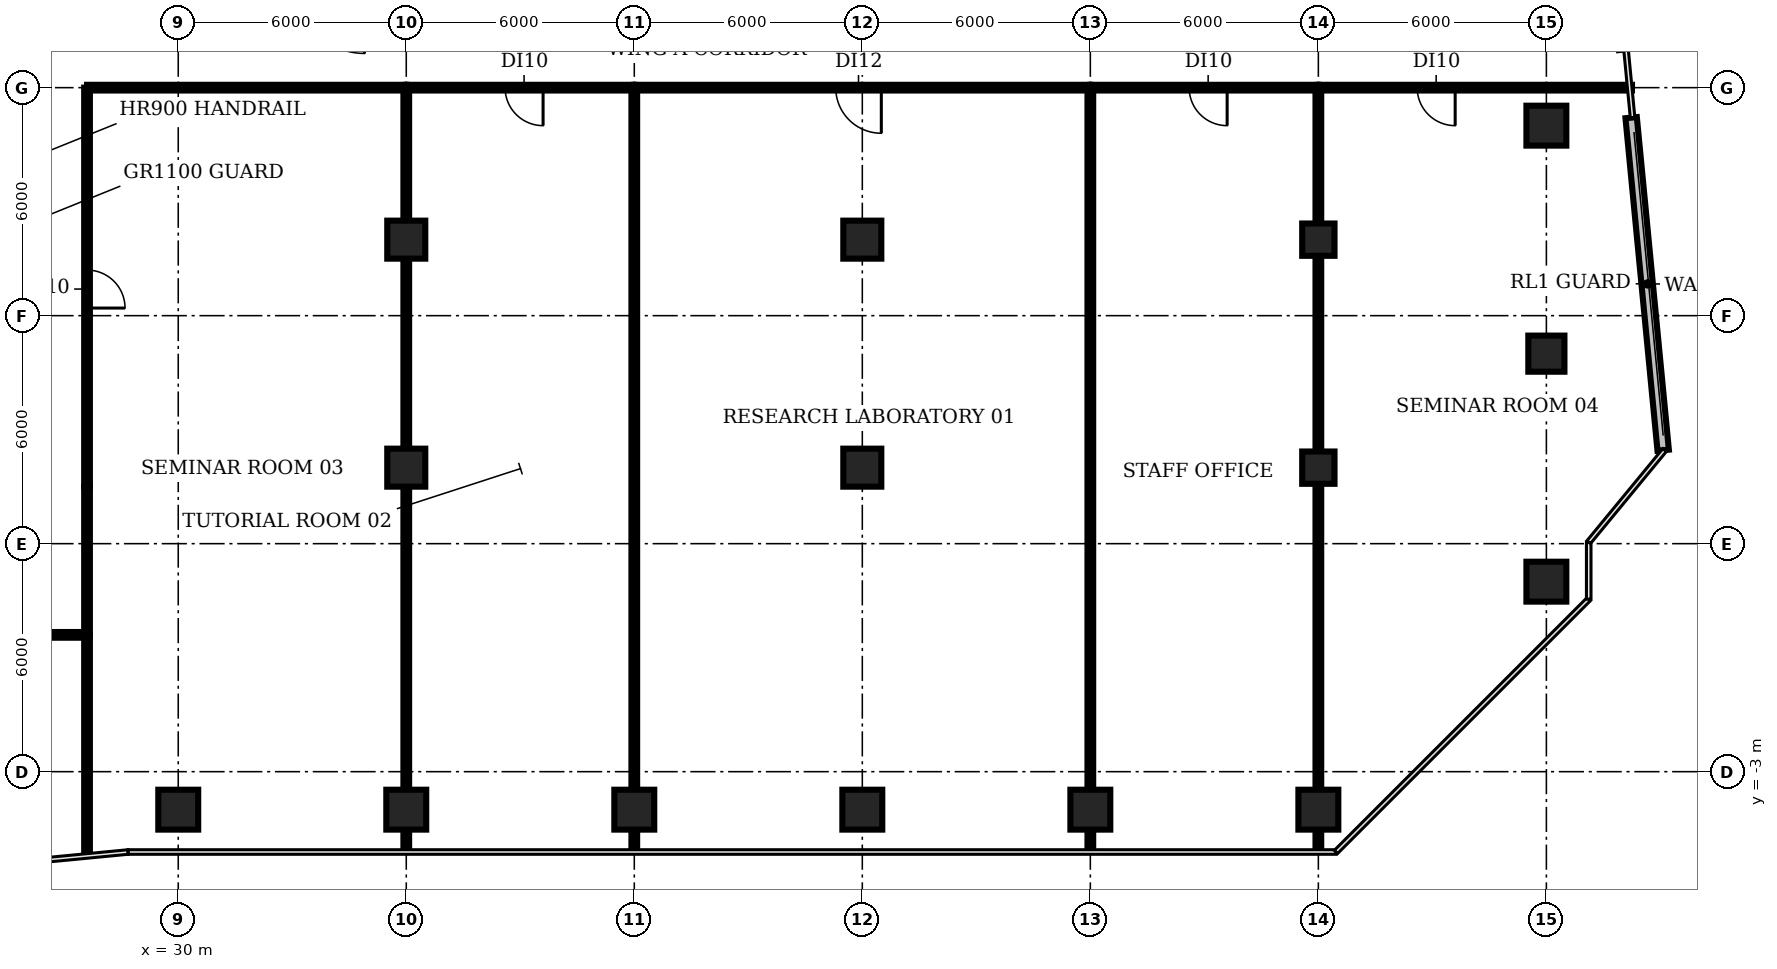
"""IFC4 building model, lengths in metres.
Left out: names, types, materials, properties, quantities, classifications, styles, units other than length and angle.
Written with IfcOpenShell. Run it as: python <this file> out.ifc"""

import sys

from ifc_helpers import new_model, si_unit, direction, frame, frame_2d, origin, origin_2d, place, context, subcontext, project, spatial, rectangle, circle, extrude, element, fill, save


model = new_model("IFC4")
c1 = context("Model", 3, precision=1e-05, world=origin(), true_north=direction((0.0, 1.0)))
c2 = subcontext(c1, "Body", "Model", "MODEL_VIEW")
j1 = project(units=[si_unit("LENGTHUNIT", "METRE"), si_unit("PLANEANGLEUNIT", "RADIAN")], contexts=[c1])
p1 = place(None, origin())
s1 = spatial("IfcSite", under=j1, at=p1, CompositionType="ELEMENT")
p2 = place(p1, origin())
s2 = spatial("IfcBuilding", under=s1, at=p2, CompositionType="ELEMENT")
p3 = place(p2, frame((0.0, 0.0, 75.2)))
s3 = spatial("IfcBuildingStorey", under=s2, at=p3, CompositionType="ELEMENT", Elevation=75.2)
for number, where, z_axis, x_axis in (
    (1, (30.0, -4.0, 0.0), (0.0, 0.0, 1.0), (1.0, 0.0, 0.0)),
    (2, (36.0, -4.0, 0.0), (0.0, 0.0, 1.0), (1.0, 0.0, 0.0)),
):
    element("IfcColumn", number, at=place(p3, frame(where, z_axis=z_axis, x_axis=x_axis)), inside=s3, PredefinedType="COLUMN", context=c2, shape_type="SweptSolid", body=[
        extrude(rectangle(XDim=1.05, YDim=1.05, at=origin_2d()), origin(), (0.0, 0.0, 1.0), 3.2),
    ])
for number, where, z_axis, x_axis in (
    (3, (36.0, 5.0, 0.0), (0.0, 0.0, 1.0), (1.0, 0.0, 0.0)),
    (4, (36.0, 11.0, 0.0), (0.0, 0.0, 1.0), (1.0, 0.0, 0.0)),
):
    element("IfcColumn", number, at=place(p3, frame(where, z_axis=z_axis, x_axis=x_axis)), inside=s3, PredefinedType="COLUMN", context=c2, shape_type="SweptSolid", body=[
        extrude(rectangle(XDim=1.0, YDim=1.0, at=origin_2d()), origin(), (0.0, 0.0, 1.0), 3.2),
    ])
for number, where, z_axis, x_axis in (
    (5, (42.0, -4.0, 0.0), (0.0, 0.0, 1.0), (1.0, 0.0, 0.0)),
    (6, (48.0, -4.0, 0.0), (0.0, 0.0, 1.0), (1.0, 0.0, 0.0)),
):
    element("IfcColumn", number, at=place(p3, frame(where, z_axis=z_axis, x_axis=x_axis)), inside=s3, PredefinedType="COLUMN", context=c2, shape_type="SweptSolid", body=[
        extrude(rectangle(XDim=1.05, YDim=1.05, at=origin_2d()), origin(), (0.0, 0.0, 1.0), 3.2),
    ])
for number, where, z_axis, x_axis in (
    (7, (48.0, 5.0, 0.0), (0.0, 0.0, 1.0), (1.0, 0.0, 0.0)),
    (8, (48.0, 11.0, 0.0), (0.0, 0.0, 1.0), (1.0, 0.0, 0.0)),
):
    element("IfcColumn", number, at=place(p3, frame(where, z_axis=z_axis, x_axis=x_axis)), inside=s3, PredefinedType="COLUMN", context=c2, shape_type="SweptSolid", body=[
        extrude(rectangle(XDim=1.0, YDim=1.0, at=origin_2d()), origin(), (0.0, 0.0, 1.0), 3.2),
    ])
p4 = place(p3, frame((54.0, -4.0, 0.0), z_axis=(0.0, 0.0, 1.0), x_axis=(1.0, 0.0, 0.0)))
e9 = element("IfcColumn", 9, at=p4, inside=s3, PredefinedType="COLUMN", context=c2, shape_type="SweptSolid", body=[
    extrude(rectangle(XDim=1.05, YDim=1.05, at=origin_2d()), origin(), (0.0, 0.0, 1.0), 3.2),
])
p5 = place(p3, frame((60.0, -4.0, 0.0), z_axis=(0.0, 0.0, 1.0), x_axis=(1.0, 0.0, 0.0)))
e10 = element("IfcColumn", 10, at=p5, inside=s3, PredefinedType="COLUMN", context=c2, shape_type="SweptSolid", body=[
    extrude(circle(Radius=0.525, at=origin_2d()), origin(), (0.0, 0.0, 1.0), 3.8),
])
for number, where, z_axis, x_axis in (
    (11, (60.0, 5.0, 0.0), (0.0, 0.0, 1.0), (1.0, 0.0, 0.0)),
    (12, (60.0, 11.0, 0.0), (0.0, 0.0, 1.0), (1.0, 0.0, 0.0)),
):
    element("IfcColumn", number, at=place(p3, frame(where, z_axis=z_axis, x_axis=x_axis)), inside=s3, PredefinedType="COLUMN", context=c2, shape_type="SweptSolid", body=[
        extrude(rectangle(XDim=0.85, YDim=0.85, at=origin_2d()), origin(), (0.0, 0.0, 1.0), 3.8),
    ])
p6 = place(p3, frame((66.0, 2.0, 0.0), z_axis=(0.0, 0.0, 1.0), x_axis=(1.0, 0.0, 0.0)))
e13 = element("IfcColumn", 13, at=p6, inside=s3, PredefinedType="COLUMN", context=c2, shape_type="SweptSolid", body=[
    extrude(circle(Radius=0.525, at=origin_2d()), origin(), (0.0, 0.0, 1.0), 3.8),
])
p7 = place(p3, frame((66.0, 8.0, 0.0), z_axis=(0.0, 0.0, 1.0), x_axis=(1.0, 0.0, 0.0)))
e14 = element("IfcColumn", 14, at=p7, inside=s3, PredefinedType="COLUMN", context=c2, shape_type="SweptSolid", body=[
    extrude(rectangle(XDim=0.95, YDim=0.95, at=origin_2d()), origin(), (0.0, 0.0, 1.0), 3.8),
])
p8 = place(p3, frame((66.0, 14.0, 0.0), z_axis=(0.0, 0.0, 1.0), x_axis=(1.0, 0.0, 0.0)))
e15 = element("IfcColumn", 15, at=p8, inside=s3, PredefinedType="COLUMN", context=c2, shape_type="SweptSolid", body=[
    extrude(circle(Radius=0.525, at=origin_2d()), origin(), (0.0, 0.0, 1.0), 3.8),
])
p9 = place(p3, frame((69.073, 5.459, 0.0), z_axis=(0.0, 0.0, 1.0), x_axis=(-0.095854735149, 0.995395333397, 0.0)))
e16 = element("IfcWall", 16, at=p9, inside=s3, PredefinedType="SOLIDWALL", context=c2, shape_type="SweptSolid", body=[
    extrude(rectangle(XDim=8.792, YDim=0.3, at=frame_2d((4.396, 0.0))), origin(), (0.0, 0.0, 1.0), 3.8),
])
p10 = place(p3, frame((27.6, -5.17, 0.0), z_axis=(0.0, 0.0, 1.0), x_axis=(0.0, 1.0, 0.0)))
e17 = element("IfcWall", 17, at=p10, inside=s3, PredefinedType="PARTITIONING", context=c2, shape_type="SweptSolid", body=[
    extrude(rectangle(XDim=5.77, YDim=0.15, at=frame_2d((2.885, 0.0))), origin(), (0.0, 0.0, 1.0), 2.78),
])
p11 = place(p3, frame((27.6, 0.6, 0.0), z_axis=(0.0, 0.0, 1.0), x_axis=(-1.0, 0.0, 0.0)))
e18 = element("IfcWall", 18, at=p11, inside=s3, PredefinedType="PARTITIONING", context=c2, shape_type="SweptSolid", body=[
    extrude(rectangle(XDim=25.2, YDim=0.15, at=frame_2d((12.6, 0.0))), origin(), (0.0, 0.0, 1.0), 2.78),
])
p12 = place(p11, frame((12.1, 0.0, 0.0)))
e19 = element("IfcOpeningElement", 19, at=p12, cuts=e18, PredefinedType="OPENING", context=c2, shape_type="SweptSolid", body=[
    extrude(rectangle(XDim=1.2, YDim=2.1, at=frame_2d((0.6, 1.05))), frame((0.0, 0.085, 0.0), z_axis=(0.0, -1.0, 0.0), x_axis=(1.0, 0.0, 0.0)), (0.0, 0.0, 1.0), 0.17),
])
p13 = place(p3, frame((27.6, 0.6, 0.0), z_axis=(0.0, 0.0, 1.0), x_axis=(0.0, 1.0, 0.0)))
e20 = element("IfcWall", 20, at=p13, inside=s3, PredefinedType="PARTITIONING", context=c2, shape_type="SweptSolid", body=[
    extrude(rectangle(XDim=3.9, YDim=0.15, at=frame_2d((1.95, 0.0))), origin(), (0.0, 0.0, 1.0), 2.78),
])
p14 = place(p3, frame((27.6, 15.0, 0.0), z_axis=(0.0, 0.0, 1.0), x_axis=(0.0, -1.0, 0.0)))
e21 = element("IfcWall", 21, at=p14, inside=s3, PredefinedType="PARTITIONING", context=c2, shape_type="SweptSolid", body=[
    extrude(rectangle(XDim=10.5, YDim=0.15, at=frame_2d((5.25, 0.0))), origin(), (0.0, 0.0, 1.0), 2.78),
])
p15 = place(p14, frame((4.8, 0.0, 0.0)))
e22 = element("IfcOpeningElement", 22, at=p15, cuts=e21, PredefinedType="OPENING", context=c2, shape_type="SweptSolid", body=[
    extrude(rectangle(XDim=1.0, YDim=2.1, at=frame_2d((0.5, 1.05))), frame((0.0, 0.085, 0.0), z_axis=(0.0, -1.0, 0.0), x_axis=(1.0, 0.0, 0.0)), (0.0, 0.0, 1.0), 0.17),
])
p16 = place(p3, frame((27.6, 15.0, 0.0), z_axis=(0.0, 0.0, 1.0), x_axis=(1.0, 0.0, 0.0)))
e23 = element("IfcWall", 23, at=p16, inside=s3, PredefinedType="PARTITIONING", context=c2, shape_type="SweptSolid", body=[
    extrude(rectangle(XDim=8.4, YDim=0.15, at=frame_2d((4.2, 0.0))), origin(), (0.0, 0.0, 1.0), 2.78),
])
for number, where, z_axis, x_axis in (
    (24, (36.0, -5.06, 0.0), (0.0, 0.0, 1.0), (0.0, 1.0, 0.0)),
    (25, (42.0, -5.06, 0.0), (0.0, 0.0, 1.0), (0.0, 1.0, 0.0)),
):
    element("IfcWall", number, at=place(p3, frame(where, z_axis=z_axis, x_axis=x_axis)), inside=s3, PredefinedType="PARTITIONING", context=c2, shape_type="SweptSolid", body=[
        extrude(rectangle(XDim=20.06, YDim=0.15, at=frame_2d((10.03, 0.0))), origin(), (0.0, 0.0, 1.0), 2.78),
    ])
p17 = place(p3, frame((42.0, 15.0, 0.0), z_axis=(0.0, 0.0, 1.0), x_axis=(-1.0, 0.0, 0.0)))
e26 = element("IfcWall", 26, at=p17, inside=s3, PredefinedType="PARTITIONING", context=c2, shape_type="SweptSolid", body=[
    extrude(rectangle(XDim=6.0, YDim=0.15, at=frame_2d((3.0, 0.0))), origin(), (0.0, 0.0, 1.0), 2.78),
])
p18 = place(p17, frame((2.4, 0.0, 0.0)))
e27 = element("IfcOpeningElement", 27, at=p18, cuts=e26, PredefinedType="OPENING", context=c2, shape_type="SweptSolid", body=[
    extrude(rectangle(XDim=1.0, YDim=2.1, at=frame_2d((0.5, 1.05))), frame((0.0, 0.085, 0.0), z_axis=(0.0, -1.0, 0.0), x_axis=(1.0, 0.0, 0.0)), (0.0, 0.0, 1.0), 0.17),
])
p19 = place(p3, frame((54.0, -5.049, 0.0), z_axis=(0.0, 0.0, 1.0), x_axis=(0.0, 1.0, 0.0)))
e28 = element("IfcWall", 28, at=p19, inside=s3, PredefinedType="PARTITIONING", context=c2, shape_type="SweptSolid", body=[
    extrude(rectangle(XDim=20.049, YDim=0.15, at=frame_2d((10.024, 0.0))), origin(), (0.0, 0.0, 1.0), 2.78),
])
p20 = place(p3, frame((54.0, 15.0, 0.0), z_axis=(0.0, 0.0, 1.0), x_axis=(-1.0, 0.0, 0.0)))
e29 = element("IfcWall", 29, at=p20, inside=s3, PredefinedType="PARTITIONING", context=c2, shape_type="SweptSolid", body=[
    extrude(rectangle(XDim=12.0, YDim=0.15, at=frame_2d((6.0, 0.0))), origin(), (0.0, 0.0, 1.0), 2.78),
])
p21 = place(p20, frame((5.5, 0.0, 0.0)))
e30 = element("IfcOpeningElement", 30, at=p21, cuts=e29, PredefinedType="OPENING", context=c2, shape_type="SweptSolid", body=[
    extrude(rectangle(XDim=1.2, YDim=2.1, at=frame_2d((0.6, 1.05))), frame((0.0, 0.085, 0.0), z_axis=(0.0, -1.0, 0.0), x_axis=(1.0, 0.0, 0.0)), (0.0, 0.0, 1.0), 0.17),
])
p22 = place(p3, frame((60.0, -5.06, 0.0), z_axis=(0.0, 0.0, 1.0), x_axis=(0.0, 1.0, 0.0)))
e31 = element("IfcWall", 31, at=p22, inside=s3, PredefinedType="PARTITIONING", context=c2, shape_type="SweptSolid", body=[
    extrude(rectangle(XDim=20.06, YDim=0.15, at=frame_2d((10.03, 0.0))), origin(), (0.0, 0.0, 1.0), 2.78),
])
p23 = place(p3, frame((60.0, 15.0, 0.0), z_axis=(0.0, 0.0, 1.0), x_axis=(-1.0, 0.0, 0.0)))
e32 = element("IfcWall", 32, at=p23, inside=s3, PredefinedType="PARTITIONING", context=c2, shape_type="SweptSolid", body=[
    extrude(rectangle(XDim=6.0, YDim=0.15, at=frame_2d((3.0, 0.0))), origin(), (0.0, 0.0, 1.0), 2.78),
])
p24 = place(p23, frame((2.4, 0.0, 0.0)))
e33 = element("IfcOpeningElement", 33, at=p24, cuts=e32, PredefinedType="OPENING", context=c2, shape_type="SweptSolid", body=[
    extrude(rectangle(XDim=1.0, YDim=2.1, at=frame_2d((0.5, 1.05))), frame((0.0, 0.085, 0.0), z_axis=(0.0, -1.0, 0.0), x_axis=(1.0, 0.0, 0.0)), (0.0, 0.0, 1.0), 0.17),
])
p25 = place(p3, frame((68.253, 15.0, 0.0), z_axis=(0.0, 0.0, 1.0), x_axis=(-1.0, 0.0, 0.0)))
e34 = element("IfcWall", 34, at=p25, inside=s3, PredefinedType="PARTITIONING", context=c2, shape_type="SweptSolid", body=[
    extrude(rectangle(XDim=8.253, YDim=0.15, at=frame_2d((4.126, 0.0))), origin(), (0.0, 0.0, 1.0), 2.78),
])
p26 = place(p25, frame((4.653, 0.0, 0.0)))
e35 = element("IfcOpeningElement", 35, at=p26, cuts=e34, PredefinedType="OPENING", context=c2, shape_type="SweptSolid", body=[
    extrude(rectangle(XDim=1.0, YDim=2.1, at=frame_2d((0.5, 1.05))), frame((0.0, 0.085, 0.0), z_axis=(0.0, -1.0, 0.0), x_axis=(1.0, 0.0, 0.0)), (0.0, 0.0, 1.0), 0.17),
])
p27 = place(p15, origin())
e36 = element("IfcDoor", 36, at=p27, inside=s3, OperationType="SINGLE_SWING_RIGHT", PredefinedType="DOOR", context=c2, shape_type="SweptSolid", body=[
    extrude(rectangle(XDim=1.0, YDim=2.1, at=frame_2d((0.5, 1.05))), frame((0.0, 0.025, 0.0), z_axis=(0.0, -1.0, 0.0), x_axis=(1.0, 0.0, 0.0)), (0.0, 0.0, 1.0), 0.05),
])
fill(e22, e36)
p28 = place(p18, origin())
e37 = element("IfcDoor", 37, at=p28, inside=s3, OperationType="SINGLE_SWING_LEFT", PredefinedType="DOOR", context=c2, shape_type="SweptSolid", body=[
    extrude(rectangle(XDim=1.0, YDim=2.1, at=frame_2d((0.5, 1.05))), frame((0.0, 0.025, 0.0), z_axis=(0.0, -1.0, 0.0), x_axis=(1.0, 0.0, 0.0)), (0.0, 0.0, 1.0), 0.05),
])
fill(e27, e37)
p29 = place(p21, origin())
e38 = element("IfcDoor", 38, at=p29, inside=s3, OperationType="SINGLE_SWING_LEFT", PredefinedType="DOOR", context=c2, shape_type="SweptSolid", body=[
    extrude(rectangle(XDim=1.2, YDim=2.1, at=frame_2d((0.6, 1.05))), frame((0.0, 0.025, 0.0), z_axis=(0.0, -1.0, 0.0), x_axis=(1.0, 0.0, 0.0)), (0.0, 0.0, 1.0), 0.05),
])
fill(e30, e38)
p30 = place(p24, origin())
e39 = element("IfcDoor", 39, at=p30, inside=s3, OperationType="SINGLE_SWING_LEFT", PredefinedType="DOOR", context=c2, shape_type="SweptSolid", body=[
    extrude(rectangle(XDim=1.0, YDim=2.1, at=frame_2d((0.5, 1.05))), frame((0.0, 0.025, 0.0), z_axis=(0.0, -1.0, 0.0), x_axis=(1.0, 0.0, 0.0)), (0.0, 0.0, 1.0), 0.05),
])
fill(e33, e39)
p31 = place(p26, origin())
e40 = element("IfcDoor", 40, at=p31, inside=s3, OperationType="SINGLE_SWING_LEFT", PredefinedType="DOOR", context=c2, shape_type="SweptSolid", body=[
    extrude(rectangle(XDim=1.0, YDim=2.1, at=frame_2d((0.5, 1.05))), frame((0.0, 0.025, 0.0), z_axis=(0.0, -1.0, 0.0), x_axis=(1.0, 0.0, 0.0)), (0.0, 0.0, 1.0), 0.05),
])
fill(e35, e40)
save(model, sys.argv[1])
